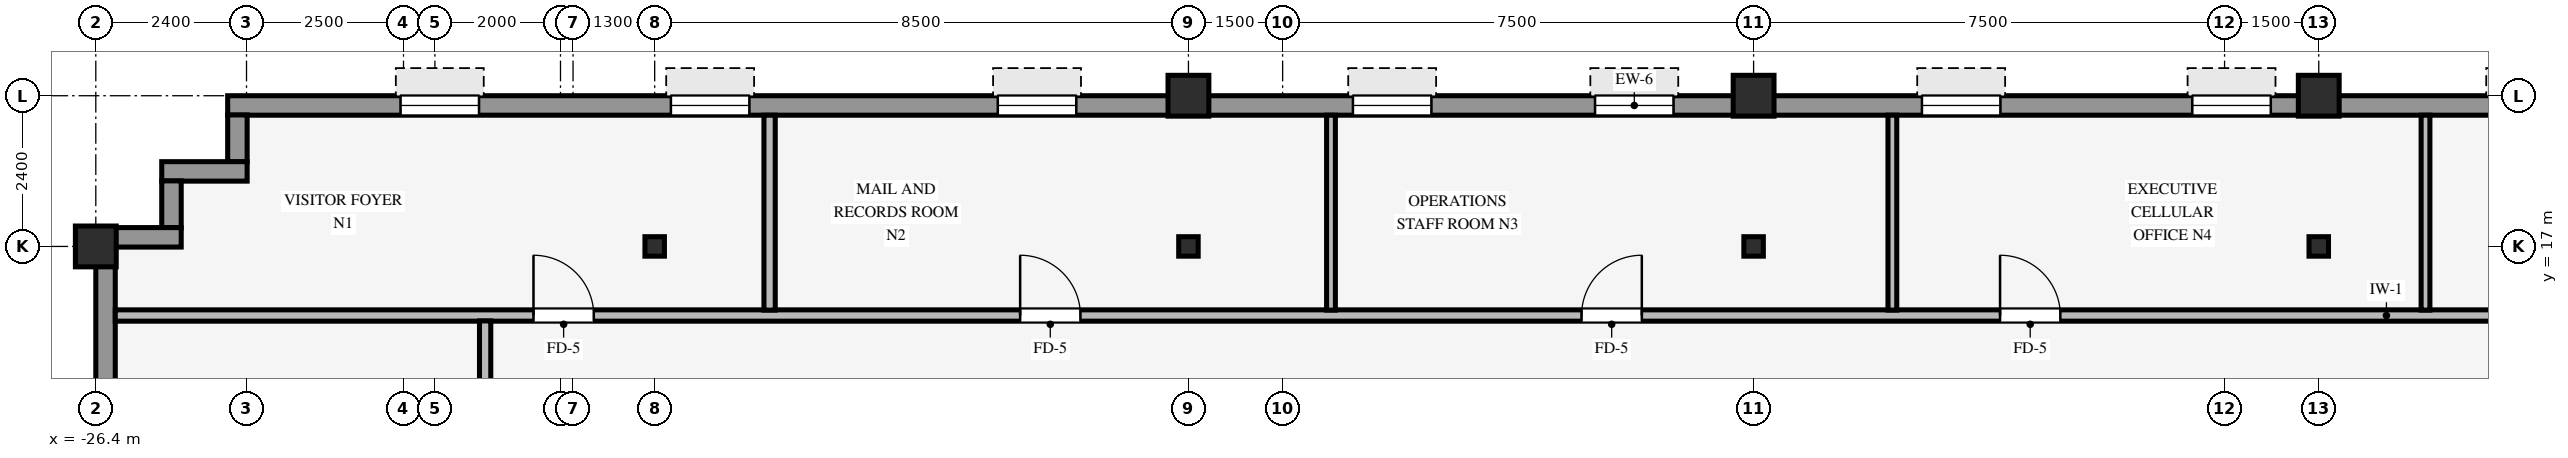
"""IFC4 building model, lengths in metres.
Left out: names, types, materials, properties, quantities, classifications, styles, units other than length and angle.
Written with IfcOpenShell. Run it as: python <this file> out.ifc"""

import sys

from ifc_helpers import new_model, si_unit, direction, frame, frame_2d, origin, origin_2d, place, context, subcontext, project, spatial, rectangle, hollow_rectangle, i_section, extrude, source, transform, mapped, element, fill, save


model = new_model("IFC4")
c1 = context("Model", 3, precision=1e-05, world=origin(), true_north=direction((0.0, 1.0)))
c2 = subcontext(c1, "Body", "Model", "MODEL_VIEW")
j1 = project(units=[si_unit("LENGTHUNIT", "METRE"), si_unit("PLANEANGLEUNIT", "RADIAN")], contexts=[c1])
p1 = place(None, origin())
s1 = spatial("IfcSite", under=j1, at=p1, CompositionType="ELEMENT")
p2 = place(p1, origin())
s2 = spatial("IfcBuilding", under=s1, at=p2, CompositionType="ELEMENT")
p3 = place(p2, frame((0.0, 0.0, 178.6)))
s3 = spatial("IfcBuildingStorey", under=s2, at=p3, CompositionType="ELEMENT", Elevation=178.6)
for number, where, z_axis, x_axis in (
    (1, (-26.4, 17.0, 0.0), (0.0, 0.0, 1.0), (1.0, 0.0, 0.0)),
    (2, (-9.0, 19.4, 0.0), (0.0, 0.0, 1.0), (1.0, 0.0, 0.0)),
    (3, (0.0, 19.4, 0.0), (0.0, 0.0, 1.0), (1.0, 0.0, 0.0)),
    (4, (9.0, 19.4, 0.0), (0.0, 0.0, 1.0), (1.0, 0.0, 0.0)),
):
    element("IfcColumn", number, at=place(p3, frame(where, z_axis=z_axis, x_axis=x_axis)), inside=s3, PredefinedType="COLUMN", context=c2, shape_type="SweptSolid", body=[
        extrude(hollow_rectangle(XDim=0.65, YDim=0.65, WallThickness=0.04, InnerFilletRadius=0.04, OuterFilletRadius=0.08, at=origin_2d()), origin(), (0.0, 0.0, 1.0), 3.37),
    ])
for number, where, z_axis, x_axis in (
    (5, (0.0, 17.0, 0.0), (0.0, 0.0, 1.0), (1.0, 0.0, 0.0)),
    (6, (-17.5, 17.0, 0.0), (0.0, 0.0, 1.0), (1.0, 0.0, 0.0)),
    (7, (-9.0, 17.0, 0.0), (0.0, 0.0, 1.0), (1.0, 0.0, 0.0)),
    (8, (9.0, 17.0, 0.0), (0.0, 0.0, 1.0), (1.0, 0.0, 0.0)),
):
    element("IfcColumn", number, at=place(p3, frame(where, z_axis=z_axis, x_axis=x_axis)), inside=s3, PredefinedType="COLUMN", context=c2, shape_type="SweptSolid", body=[
        extrude(i_section(OverallWidth=0.31, OverallDepth=0.31, WebThickness=0.015, FlangeThickness=0.015, FilletRadius=0.015, at=origin_2d()), origin(), (0.0, 0.0, 1.0), 3.37),
    ])
p4 = place(p3, frame((-24.3, 19.245, 0.0), z_axis=(0.0, 0.0, 1.0), x_axis=(1.0, 0.0, 0.0)))
e9 = element("IfcWall", 9, at=p4, inside=s3, PredefinedType="STANDARD", context=c2, shape_type="SweptSolid", body=[
    extrude(rectangle(XDim=44.8, YDim=0.31, at=frame_2d((22.4, 0.0))), origin(), (0.0, 0.0, 1.0), 2.705),
])
p5 = place(p4, frame((2.753, 0.0, 0.8)))
e10 = element("IfcOpeningElement", 10, at=p5, cuts=e9, PredefinedType="OPENING", context=c2, shape_type="SweptSolid", body=[
    extrude(rectangle(XDim=1.25, YDim=1.52, at=frame_2d((0.625, 0.76))), frame((0.0, 0.165, 0.0), z_axis=(0.0, -1.0, 0.0), x_axis=(1.0, 0.0, 0.0)), (0.0, 0.0, 1.0), 0.33),
])
p6 = place(p4, frame((7.058, 0.0, 0.8)))
e11 = element("IfcOpeningElement", 11, at=p6, cuts=e9, PredefinedType="OPENING", context=c2, shape_type="SweptSolid", body=[
    extrude(rectangle(XDim=1.25, YDim=1.52, at=frame_2d((0.625, 0.76))), frame((0.0, 0.165, 0.0), z_axis=(0.0, -1.0, 0.0), x_axis=(1.0, 0.0, 0.0)), (0.0, 0.0, 1.0), 0.33),
])
p7 = place(p4, frame((12.264, 0.0, 0.8)))
e12 = element("IfcOpeningElement", 12, at=p7, cuts=e9, PredefinedType="OPENING", context=c2, shape_type="SweptSolid", body=[
    extrude(rectangle(XDim=1.25, YDim=1.52, at=frame_2d((0.625, 0.76))), frame((0.0, 0.165, 0.0), z_axis=(0.0, -1.0, 0.0), x_axis=(1.0, 0.0, 0.0)), (0.0, 0.0, 1.0), 0.33),
])
p8 = place(p4, frame((17.919, 0.0, 0.8)))
e13 = element("IfcOpeningElement", 13, at=p8, cuts=e9, PredefinedType="OPENING", context=c2, shape_type="SweptSolid", body=[
    extrude(rectangle(XDim=1.25, YDim=1.52, at=frame_2d((0.625, 0.76))), frame((0.0, 0.165, 0.0), z_axis=(0.0, -1.0, 0.0), x_axis=(1.0, 0.0, 0.0)), (0.0, 0.0, 1.0), 0.33),
])
p9 = place(p4, frame((21.775, 0.0, 0.8)))
e14 = element("IfcOpeningElement", 14, at=p9, cuts=e9, PredefinedType="OPENING", context=c2, shape_type="SweptSolid", body=[
    extrude(rectangle(XDim=1.25, YDim=1.52, at=frame_2d((0.625, 0.76))), frame((0.0, 0.165, 0.0), z_axis=(0.0, -1.0, 0.0), x_axis=(1.0, 0.0, 0.0)), (0.0, 0.0, 1.0), 0.33),
])
p10 = place(p4, frame((26.981, 0.0, 0.8)))
e15 = element("IfcOpeningElement", 15, at=p10, cuts=e9, PredefinedType="OPENING", context=c2, shape_type="SweptSolid", body=[
    extrude(rectangle(XDim=1.25, YDim=1.52, at=frame_2d((0.625, 0.76))), frame((0.0, 0.165, 0.0), z_axis=(0.0, -1.0, 0.0), x_axis=(1.0, 0.0, 0.0)), (0.0, 0.0, 1.0), 0.33),
])
p11 = place(p4, frame((31.286, 0.0, 0.8)))
e16 = element("IfcOpeningElement", 16, at=p11, cuts=e9, PredefinedType="OPENING", context=c2, shape_type="SweptSolid", body=[
    extrude(rectangle(XDim=1.25, YDim=1.52, at=frame_2d((0.625, 0.76))), frame((0.0, 0.165, 0.0), z_axis=(0.0, -1.0, 0.0), x_axis=(1.0, 0.0, 0.0)), (0.0, 0.0, 1.0), 0.33),
])
p12 = place(p4, frame((36.042, 0.0, 0.8)))
e17 = element("IfcOpeningElement", 17, at=p12, cuts=e9, PredefinedType="OPENING", context=c2, shape_type="SweptSolid", body=[
    extrude(rectangle(XDim=1.25, YDim=1.52, at=frame_2d((0.625, 0.76))), frame((0.0, 0.165, 0.0), z_axis=(0.0, -1.0, 0.0), x_axis=(1.0, 0.0, 0.0)), (0.0, 0.0, 1.0), 0.33),
])
p13 = place(p4, frame((40.797, 0.0, 0.8)))
e18 = element("IfcOpeningElement", 18, at=p13, cuts=e9, PredefinedType="OPENING", context=c2, shape_type="SweptSolid", body=[
    extrude(rectangle(XDim=1.25, YDim=1.52, at=frame_2d((0.625, 0.76))), frame((0.0, 0.165, 0.0), z_axis=(0.0, -1.0, 0.0), x_axis=(1.0, 0.0, 0.0)), (0.0, 0.0, 1.0), 0.33),
])
p14 = place(p3, frame((-24.145, 18.346, 0.0), z_axis=(0.0, 0.0, 1.0), x_axis=(0.0, 1.0, 0.0)))
e19 = element("IfcWall", 19, at=p14, inside=s3, PredefinedType="STANDARD", context=c2, shape_type="SweptSolid", body=[
    extrude(rectangle(XDim=0.748, YDim=0.31, at=frame_2d((0.374, 0.0))), origin(), (0.0, 0.0, 1.0), 2.816),
])
p15 = place(p3, frame((-25.35, 18.195, 0.0), z_axis=(0.0, 0.0, 1.0), x_axis=(1.0, 0.0, 0.0)))
e20 = element("IfcWall", 20, at=p15, inside=s3, PredefinedType="STANDARD", context=c2, shape_type="SweptSolid", body=[
    extrude(rectangle(XDim=1.36, YDim=0.31, at=frame_2d((0.68, 0.0))), origin(), (0.0, 0.0, 1.0), 2.816),
])
p16 = place(p3, frame((-25.195, 17.296, 0.0), z_axis=(0.0, 0.0, 1.0), x_axis=(0.0, 1.0, 0.0)))
e21 = element("IfcWall", 21, at=p16, inside=s3, PredefinedType="STANDARD", context=c2, shape_type="SweptSolid", body=[
    extrude(rectangle(XDim=0.748, YDim=0.31, at=frame_2d((0.374, 0.0))), origin(), (0.0, 0.0, 1.0), 2.816),
])
p17 = place(p3, frame((-26.4, 17.145, 0.0), z_axis=(0.0, 0.0, 1.0), x_axis=(1.0, 0.0, 0.0)))
e22 = element("IfcWall", 22, at=p17, inside=s3, PredefinedType="STANDARD", context=c2, shape_type="SweptSolid", body=[
    extrude(rectangle(XDim=1.36, YDim=0.31, at=frame_2d((0.68, 0.0))), origin(), (0.0, 0.0, 1.0), 2.816),
])
p18 = place(p3, frame((-26.245, -20.794, 0.0), z_axis=(0.0, 0.0, 1.0), x_axis=(0.0, 1.0, 0.0)))
e23 = element("IfcWall", 23, at=p18, inside=s3, PredefinedType="STANDARD", context=c2, shape_type="SweptSolid", body=[
    extrude(rectangle(XDim=37.788, YDim=0.31, at=frame_2d((18.894, 0.0))), origin(), (0.0, 0.0, 1.0), 2.705),
])
p19 = place(p18, frame((7.644, 0.0, 0.8)))
e24 = element("IfcOpeningElement", 24, at=p19, cuts=e23, PredefinedType="OPENING", context=c2, shape_type="SweptSolid", body=[
    extrude(rectangle(XDim=2.05, YDim=1.52, at=frame_2d((1.025, 0.76))), frame((0.0, 0.165, 0.0), z_axis=(0.0, -1.0, 0.0), x_axis=(1.0, 0.0, 0.0)), (0.0, 0.0, 1.0), 0.33),
])
p20 = place(p18, frame((12.756, 0.0, 0.8)))
e25 = element("IfcOpeningElement", 25, at=p20, cuts=e23, PredefinedType="OPENING", context=c2, shape_type="SweptSolid", body=[
    extrude(rectangle(XDim=2.05, YDim=1.52, at=frame_2d((1.025, 0.76))), frame((0.0, 0.165, 0.0), z_axis=(0.0, -1.0, 0.0), x_axis=(1.0, 0.0, 0.0)), (0.0, 0.0, 1.0), 0.33),
])
p21 = place(p18, frame((17.869, 0.0, 0.8)))
e26 = element("IfcOpeningElement", 26, at=p21, cuts=e23, PredefinedType="OPENING", context=c2, shape_type="SweptSolid", body=[
    extrude(rectangle(XDim=2.05, YDim=1.52, at=frame_2d((1.025, 0.76))), frame((0.0, 0.165, 0.0), z_axis=(0.0, -1.0, 0.0), x_axis=(1.0, 0.0, 0.0)), (0.0, 0.0, 1.0), 0.33),
])
p22 = place(p18, frame((22.531, 0.0, 0.8)))
e27 = element("IfcOpeningElement", 27, at=p22, cuts=e23, PredefinedType="OPENING", context=c2, shape_type="SweptSolid", body=[
    extrude(rectangle(XDim=2.05, YDim=1.52, at=frame_2d((1.025, 0.76))), frame((0.0, 0.165, 0.0), z_axis=(0.0, -1.0, 0.0), x_axis=(1.0, 0.0, 0.0)), (0.0, 0.0, 1.0), 0.33),
])
p23 = place(p18, frame((27.194, 0.0, 0.8)))
e28 = element("IfcOpeningElement", 28, at=p23, cuts=e23, PredefinedType="OPENING", context=c2, shape_type="SweptSolid", body=[
    extrude(rectangle(XDim=2.05, YDim=1.52, at=frame_2d((1.025, 0.76))), frame((0.0, 0.165, 0.0), z_axis=(0.0, -1.0, 0.0), x_axis=(1.0, 0.0, 0.0)), (0.0, 0.0, 1.0), 0.33),
])
p24 = place(p18, frame((33.207, 0.0, 0.8)))
e29 = element("IfcOpeningElement", 29, at=p24, cuts=e23, PredefinedType="OPENING", context=c2, shape_type="SweptSolid", body=[
    extrude(rectangle(XDim=2.05, YDim=1.52, at=frame_2d((1.025, 0.76))), frame((0.0, 0.165, 0.0), z_axis=(0.0, -1.0, 0.0), x_axis=(1.0, 0.0, 0.0)), (0.0, 0.0, 1.0), 0.33),
])
p25 = place(p3, frame((-26.09, 15.9, 0.0), z_axis=(0.0, 0.0, 1.0), x_axis=(1.0, 0.0, 0.0)))
e30 = element("IfcWall", 30, at=p25, inside=s3, PredefinedType="PARTITIONING", context=c2, shape_type="SweptSolid", body=[
    extrude(rectangle(XDim=48.38, YDim=0.18, at=frame_2d((24.19, 0.0))), origin(), (0.0, 0.0, 1.0), 3.36),
])
p26 = place(p25, frame((41.36, 0.0, 0.0)))
e31 = element("IfcOpeningElement", 31, at=p26, cuts=e30, PredefinedType="OPENING", context=c2, shape_type="SweptSolid", body=[
    extrude(rectangle(XDim=0.96, YDim=2.1, at=frame_2d((0.48, 1.05))), frame((0.0, 0.1, 0.0), z_axis=(0.0, -1.0, 0.0), x_axis=(1.0, 0.0, 0.0)), (0.0, 0.0, 1.0), 0.2),
])
p27 = place(p25, frame((23.35, 0.0, 0.0)))
e32 = element("IfcOpeningElement", 32, at=p27, cuts=e30, PredefinedType="OPENING", context=c2, shape_type="SweptSolid", body=[
    extrude(rectangle(XDim=0.96, YDim=2.1, at=frame_2d((0.48, 1.05))), frame((0.0, 0.1, 0.0), z_axis=(0.0, -1.0, 0.0), x_axis=(1.0, 0.0, 0.0)), (0.0, 0.0, 1.0), 0.2),
])
p28 = place(p25, frame((14.41, 0.0, 0.0)))
e33 = element("IfcOpeningElement", 33, at=p28, cuts=e30, PredefinedType="OPENING", context=c2, shape_type="SweptSolid", body=[
    extrude(rectangle(XDim=0.96, YDim=2.1, at=frame_2d((0.48, 1.05))), frame((0.0, 0.1, 0.0), z_axis=(0.0, -1.0, 0.0), x_axis=(1.0, 0.0, 0.0)), (0.0, 0.0, 1.0), 0.2),
])
p29 = place(p25, frame((30.015, 0.0, 0.0)))
e34 = element("IfcOpeningElement", 34, at=p29, cuts=e30, PredefinedType="OPENING", context=c2, shape_type="SweptSolid", body=[
    extrude(rectangle(XDim=0.96, YDim=2.1, at=frame_2d((0.48, 1.05))), frame((0.0, 0.1, 0.0), z_axis=(0.0, -1.0, 0.0), x_axis=(1.0, 0.0, 0.0)), (0.0, 0.0, 1.0), 0.2),
])
p30 = place(p25, frame((6.66, 0.0, 0.0)))
e35 = element("IfcOpeningElement", 35, at=p30, cuts=e30, PredefinedType="OPENING", context=c2, shape_type="SweptSolid", body=[
    extrude(rectangle(XDim=0.96, YDim=2.1, at=frame_2d((0.48, 1.05))), frame((0.0, 0.1, 0.0), z_axis=(0.0, -1.0, 0.0), x_axis=(1.0, 0.0, 0.0)), (0.0, 0.0, 1.0), 0.2),
])
p31 = place(p3, frame((-20.2, -15.814, 0.0), z_axis=(0.0, 0.0, 1.0), x_axis=(0.0, 1.0, 0.0)))
e36 = element("IfcWall", 36, at=p31, inside=s3, PredefinedType="PARTITIONING", context=c2, shape_type="SweptSolid", body=[
    extrude(rectangle(XDim=31.628, YDim=0.18, at=frame_2d((15.814, 0.0))), origin(), (0.0, 0.0, 1.0), 3.36),
])
p32 = place(p31, frame((10.684, 0.0, 0.0)))
e37 = element("IfcOpeningElement", 37, at=p32, cuts=e36, PredefinedType="OPENING", context=c2, shape_type="SweptSolid", body=[
    extrude(rectangle(XDim=0.96, YDim=2.1, at=frame_2d((0.48, 1.05))), frame((0.0, 0.1, 0.0), z_axis=(0.0, -1.0, 0.0), x_axis=(1.0, 0.0, 0.0)), (0.0, 0.0, 1.0), 0.2),
])
p33 = place(p31, frame((24.184, 0.0, 0.0)))
e38 = element("IfcOpeningElement", 38, at=p33, cuts=e36, PredefinedType="OPENING", context=c2, shape_type="SweptSolid", body=[
    extrude(rectangle(XDim=0.96, YDim=2.1, at=frame_2d((0.48, 1.05))), frame((0.0, 0.1, 0.0), z_axis=(0.0, -1.0, 0.0), x_axis=(1.0, 0.0, 0.0)), (0.0, 0.0, 1.0), 0.2),
])
p34 = place(p3, frame((-15.67, 15.986, 0.0), z_axis=(0.0, 0.0, 1.0), x_axis=(0.0, 1.0, 0.0)))
e39 = element("IfcWall", 39, at=p34, inside=s3, PredefinedType="PARTITIONING", context=c2, shape_type="SweptSolid", body=[
    extrude(rectangle(XDim=3.104, YDim=0.18, at=frame_2d((1.552, 0.0))), origin(), (0.0, 0.0, 1.0), 3.36),
])
for number, where, z_axis, x_axis in (
    (40, (-6.73, 15.986, 0.0), (0.0, 0.0, 1.0), (0.0, 1.0, 0.0)),
    (41, (2.21, 15.986, 0.0), (0.0, 0.0, 1.0), (0.0, 1.0, 0.0)),
    (42, (10.7, 15.986, 0.0), (0.0, 0.0, 1.0), (0.0, 1.0, 0.0)),
):
    element("IfcWall", number, at=place(p3, frame(where, z_axis=z_axis, x_axis=x_axis)), inside=s3, PredefinedType="PARTITIONING", context=c2, shape_type="SweptSolid", body=[
        extrude(rectangle(XDim=3.104, YDim=0.14, at=frame_2d((1.552, 0.0))), origin(), (0.0, 0.0, 1.0), 3.36),
    ])
m1 = source(origin(), c2, "Body", "SweptSolid", [
    extrude(rectangle(XDim=1.25, YDim=1.52, at=frame_2d((0.625, 0.76))), frame((0.0, 0.03, 0.0), z_axis=(0.0, -1.0, 0.0), x_axis=(1.0, 0.0, 0.0)), (0.0, 0.0, 1.0), 0.06),
])
p35 = place(p5, origin())
e43 = element("IfcWindow", 43, at=p35, inside=s3, PartitioningType="SINGLE_PANEL", PredefinedType="WINDOW", context=c2, shape_type="MappedRepresentation", body=[
    mapped(m1, transform((0.0, 0.0, 0.0), scale=1.0)),
])
fill(e10, e43)
p36 = place(p6, origin())
e44 = element("IfcWindow", 44, at=p36, inside=s3, PartitioningType="SINGLE_PANEL", PredefinedType="WINDOW", context=c2, shape_type="MappedRepresentation", body=[
    mapped(m1, transform((0.0, 0.0, 0.0), scale=1.0)),
])
fill(e11, e44)
p37 = place(p7, origin())
e45 = element("IfcWindow", 45, at=p37, inside=s3, PartitioningType="SINGLE_PANEL", PredefinedType="WINDOW", context=c2, shape_type="MappedRepresentation", body=[
    mapped(m1, transform((0.0, 0.0, 0.0), scale=1.0)),
])
fill(e12, e45)
p38 = place(p8, origin())
e46 = element("IfcWindow", 46, at=p38, inside=s3, PartitioningType="SINGLE_PANEL", PredefinedType="WINDOW", context=c2, shape_type="MappedRepresentation", body=[
    mapped(m1, transform((0.0, 0.0, 0.0), scale=1.0)),
])
fill(e13, e46)
p39 = place(p9, origin())
e47 = element("IfcWindow", 47, at=p39, inside=s3, PartitioningType="SINGLE_PANEL", PredefinedType="WINDOW", context=c2, shape_type="MappedRepresentation", body=[
    mapped(m1, transform((0.0, 0.0, 0.0), scale=1.0)),
])
fill(e14, e47)
p40 = place(p10, origin())
e48 = element("IfcWindow", 48, at=p40, inside=s3, PartitioningType="SINGLE_PANEL", PredefinedType="WINDOW", context=c2, shape_type="MappedRepresentation", body=[
    mapped(m1, transform((0.0, 0.0, 0.0), scale=1.0)),
])
fill(e15, e48)
p41 = place(p11, origin())
e49 = element("IfcWindow", 49, at=p41, inside=s3, PartitioningType="SINGLE_PANEL", PredefinedType="WINDOW", context=c2, shape_type="MappedRepresentation", body=[
    mapped(m1, transform((0.0, 0.0, 0.0), scale=1.0)),
])
fill(e16, e49)
m2 = source(origin(), c2, "Body", "SweptSolid", [
    extrude(rectangle(XDim=0.96, YDim=2.1, at=frame_2d((0.48, 1.05))), frame((0.0, 0.025, 0.0), z_axis=(0.0, -1.0, 0.0), x_axis=(1.0, 0.0, 0.0)), (0.0, 0.0, 1.0), 0.05),
])
p42 = place(p27, origin())
e50 = element("IfcDoor", 50, at=p42, inside=s3, OperationType="SINGLE_SWING_RIGHT", PredefinedType="DOOR", context=c2, shape_type="MappedRepresentation", body=[
    mapped(m2, transform((0.0, 0.0, 0.0), scale=1.0)),
])
fill(e32, e50)
p43 = place(p28, origin())
e51 = element("IfcDoor", 51, at=p43, inside=s3, OperationType="SINGLE_SWING_LEFT", PredefinedType="DOOR", context=c2, shape_type="MappedRepresentation", body=[
    mapped(m2, transform((0.0, 0.0, 0.0), scale=1.0)),
])
fill(e33, e51)
p44 = place(p29, origin())
e52 = element("IfcDoor", 52, at=p44, inside=s3, OperationType="SINGLE_SWING_LEFT", PredefinedType="DOOR", context=c2, shape_type="MappedRepresentation", body=[
    mapped(m2, transform((0.0, 0.0, 0.0), scale=1.0)),
])
fill(e34, e52)
p45 = place(p30, origin())
e53 = element("IfcDoor", 53, at=p45, inside=s3, OperationType="SINGLE_SWING_LEFT", PredefinedType="DOOR", context=c2, shape_type="MappedRepresentation", body=[
    mapped(m2, transform((0.0, 0.0, 0.0), scale=1.0)),
])
fill(e35, e53)
save(model, sys.argv[1])
